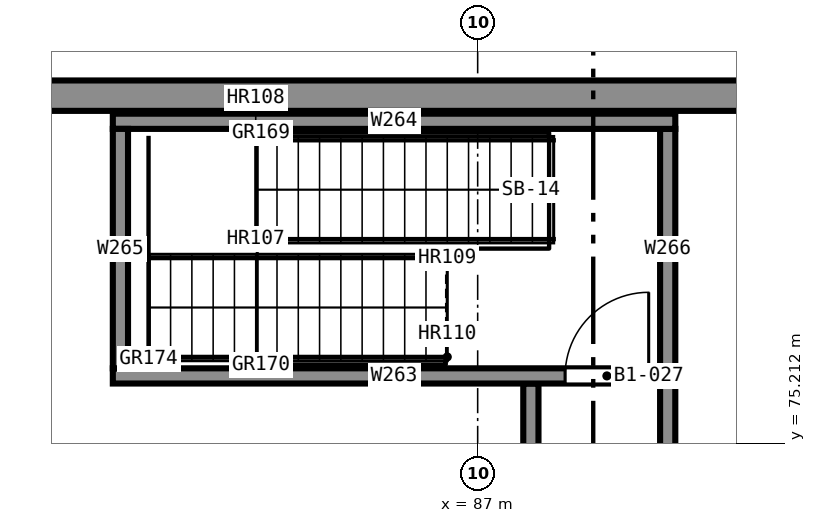
"""IFC4 building model, lengths in metres.
Left out: names, types, materials, properties, quantities, classifications, styles, units other than length and angle.
Written with IfcOpenShell. Run it as: python <this file> out.ifc"""

import sys

from ifc_helpers import new_model, si_unit, direction, frame, frame_2d, origin, place, context, subcontext, project, spatial, rectangle, extrude, element, fill, save


model = new_model("IFC4")
c1 = context("Model", 3, precision=1e-05, world=origin(), true_north=direction((0.0, 1.0)))
c2 = subcontext(c1, "Body", "Model", "MODEL_VIEW")
j1 = project(units=[si_unit("LENGTHUNIT", "METRE"), si_unit("PLANEANGLEUNIT", "RADIAN")], contexts=[c1])
p1 = place(None, origin())
s1 = spatial("IfcSite", under=j1, at=p1, CompositionType="ELEMENT")
p2 = place(p1, origin())
s2 = spatial("IfcBuilding", under=s1, at=p2, CompositionType="ELEMENT")
p3 = place(p2, frame((0.0, 0.0, -5.0)))
s3 = spatial("IfcBuildingStorey", under=s2, at=p3, CompositionType="ELEMENT", Elevation=-5.0)
p4 = place(p3, frame((82.2, 76.1, 0.0), z_axis=(0.0, 0.0, 1.0), x_axis=(1.0, 0.0, 0.0)))
e1 = element("IfcWall", 1, at=p4, inside=s3, PredefinedType="SHEAR", context=c2, shape_type="SweptSolid", body=[
    extrude(rectangle(XDim=7.4, YDim=0.2, at=frame_2d((3.7, 0.0))), origin(), (0.0, 0.0, 1.0), 5.0),
])
p5 = place(p4, frame((5.95, 0.0, 0.0)))
e2 = element("IfcOpeningElement", 2, at=p5, cuts=e1, PredefinedType="OPENING", context=c2, shape_type="SweptSolid", body=[
    extrude(rectangle(XDim=1.1, YDim=2.1, at=frame_2d((0.55, 1.05))), frame((0.0, 0.11, 0.0), z_axis=(0.0, -1.0, 0.0), x_axis=(1.0, 0.0, 0.0)), (0.0, 0.0, 1.0), 0.22),
])
p6 = place(p3, frame((89.6, 79.45, 0.0), z_axis=(0.0, 0.0, 1.0), x_axis=(-1.0, 0.0, 0.0)))
e3 = element("IfcWall", 3, at=p6, inside=s3, PredefinedType="SHEAR", context=c2, shape_type="SweptSolid", body=[
    extrude(rectangle(XDim=7.4, YDim=0.2, at=frame_2d((3.7, 0.0))), origin(), (0.0, 0.0, 1.0), 5.0),
])
for number, where, z_axis, x_axis in (
    (4, (82.3, 79.35, 0.0), (0.0, 0.0, 1.0), (0.0, -1.0, 0.0)),
    (5, (89.5, 76.2, 0.0), (0.0, 0.0, 1.0), (0.0, 1.0, 0.0)),
):
    element("IfcWall", number, at=place(p3, frame(where, z_axis=z_axis, x_axis=x_axis)), inside=s3, PredefinedType="SHEAR", context=c2, shape_type="SweptSolid", body=[
        extrude(rectangle(XDim=3.15, YDim=0.2, at=frame_2d((1.575, 0.0))), origin(), (0.0, 0.0, 1.0), 5.0),
    ])
p7 = place(p3, frame((77.628, 79.787, 0.0), z_axis=(0.0, 0.0, 1.0), x_axis=(1.0, 0.0, 0.0)))
e6 = element("IfcWall", 6, at=p7, inside=s3, PredefinedType="SHEAR", context=c2, shape_type="SweptSolid", body=[
    extrude(rectangle(XDim=32.735, YDim=0.4, at=frame_2d((16.367, 0.0))), origin(), (0.0, 0.0, 1.0), 4.65),
])
for number, where, z_axis, x_axis in (
    (7, (87.7, 59.6, 0.0), (0.0, 0.0, 1.0), (0.0, 1.0, 0.0)),
    (8, (89.5, 59.6, 0.0), (0.0, 0.0, 1.0), (0.0, 1.0, 0.0)),
):
    element("IfcWall", number, at=place(p3, frame(where, z_axis=z_axis, x_axis=x_axis)), inside=s3, PredefinedType="PARTITIONING", context=c2, shape_type="SweptSolid", body=[
        extrude(rectangle(XDim=16.4, YDim=0.2, at=frame_2d((8.2, 0.0))), origin(), (0.0, 0.0, 1.0), 4.65),
    ])
p8 = place(p5, origin())
e9 = element("IfcDoor", 9, at=p8, inside=s3, OperationType="SINGLE_SWING_LEFT", PredefinedType="DOOR", context=c2, shape_type="SweptSolid", body=[
    extrude(rectangle(XDim=1.1, YDim=2.1, at=frame_2d((0.55, 1.05))), frame((0.0, 0.025, 0.0), z_axis=(0.0, -1.0, 0.0), x_axis=(1.0, 0.0, 0.0)), (0.0, 0.0, 1.0), 0.05),
])
fill(e2, e9)
save(model, sys.argv[1])
